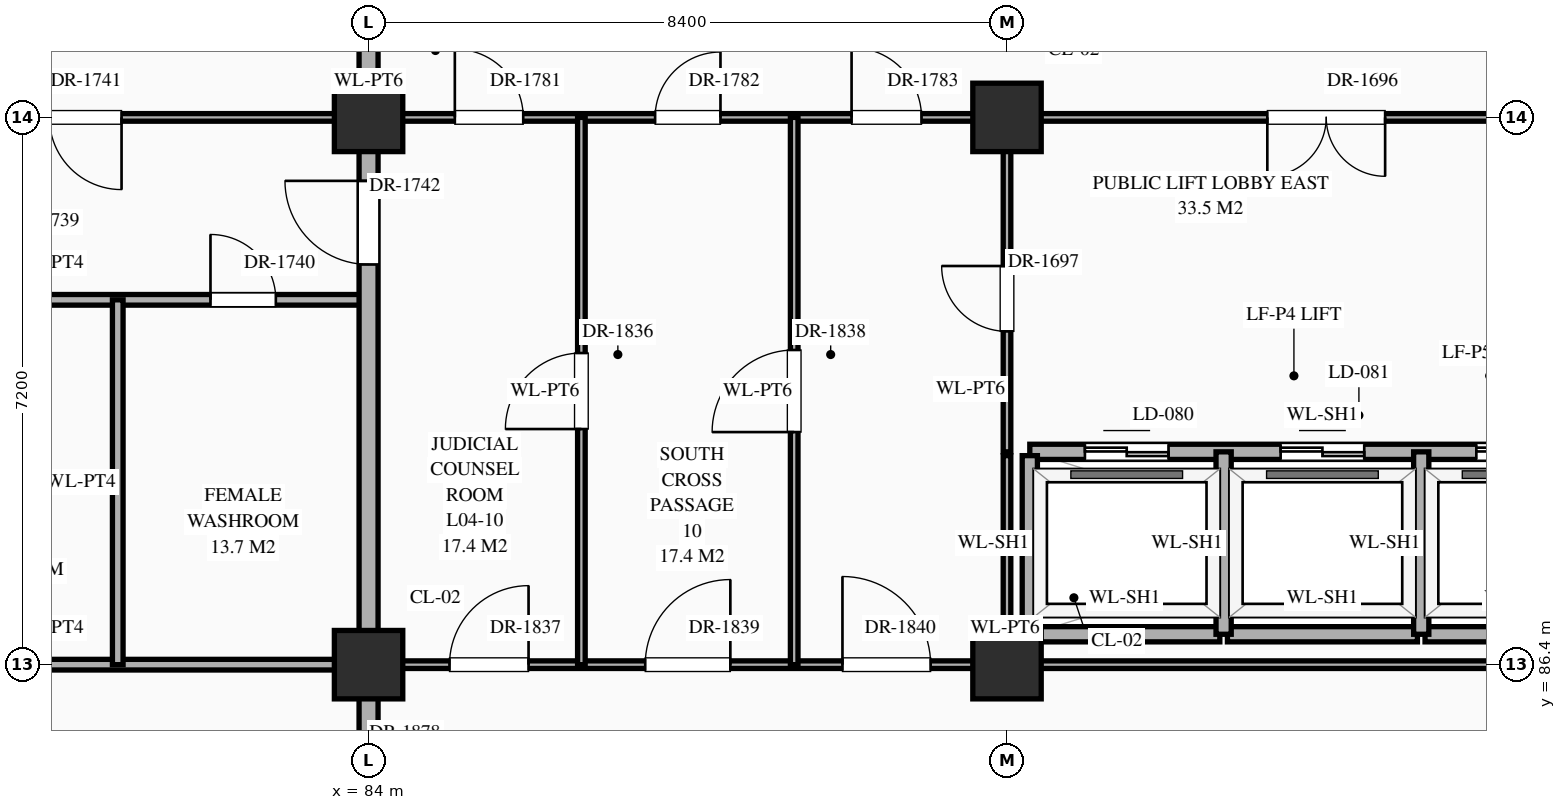
"""IFC4 building model, lengths in metres.
Left out: names, types, materials, properties, quantities, classifications, styles, units other than length and angle.
Written with IfcOpenShell. Run it as: python <this file> out.ifc"""

import sys

from ifc_helpers import new_model, si_unit, direction, frame, frame_2d, origin, origin_2d, place, context, subcontext, project, spatial, rectangle, extrude, element, fill, save


model = new_model("IFC4")
c1 = context("Model", 3, precision=1e-05, world=origin(), true_north=direction((0.0, 1.0)))
c2 = subcontext(c1, "Body", "Model", "MODEL_VIEW")
j1 = project(units=[si_unit("LENGTHUNIT", "METRE"), si_unit("PLANEANGLEUNIT", "RADIAN")], contexts=[c1])
p1 = place(None, origin())
s1 = spatial("IfcSite", under=j1, at=p1, CompositionType="ELEMENT")
p2 = place(p1, origin())
s2 = spatial("IfcBuilding", under=s1, at=p2, CompositionType="ELEMENT")
p3 = place(p2, frame((0.0, 0.0, 16.2)))
s3 = spatial("IfcBuildingStorey", under=s2, at=p3, CompositionType="ELEMENT", Elevation=16.2)
for number, where, z_axis, x_axis in (
    (1, (84.0, 86.4, 0.0), (0.0, 0.0, 1.0), (1.0, 0.0, 0.0)),
    (2, (84.0, 93.6, 0.0), (0.0, 0.0, 1.0), (1.0, 0.0, 0.0)),
    (3, (92.4, 86.4, 0.0), (0.0, 0.0, 1.0), (1.0, 0.0, 0.0)),
    (4, (92.4, 93.6, 0.0), (0.0, 0.0, 1.0), (1.0, 0.0, 0.0)),
):
    element("IfcColumn", number, at=place(p3, frame(where, z_axis=z_axis, x_axis=x_axis)), inside=s3, PredefinedType="COLUMN", context=c2, shape_type="SweptSolid", body=[
        extrude(rectangle(XDim=0.9, YDim=0.9, at=origin_2d()), origin(), (0.0, 0.0, 1.0), 5.4),
    ])
p4 = place(p3, frame((75.6, 86.4, 0.0), z_axis=(0.0, 0.0, 1.0), x_axis=(1.0, 0.0, 0.0)))
e5 = element("IfcWall", 5, at=p4, inside=s3, PredefinedType="STANDARD", context=c2, shape_type="SweptSolid", body=[
    extrude(rectangle(XDim=8.4, YDim=0.14, at=frame_2d((4.2, 0.0))), origin(), (0.0, 0.0, 1.0), 4.27),
])
p5 = place(p3, frame((84.0, 86.4, 0.0), z_axis=(0.0, 0.0, 1.0), x_axis=(1.0, 0.0, 0.0)))
e6 = element("IfcWall", 6, at=p5, inside=s3, PredefinedType="STANDARD", context=c2, shape_type="SweptSolid", body=[
    extrude(rectangle(XDim=8.4, YDim=0.1, at=frame_2d((4.2, 0.0))), origin(), (0.0, 0.0, 1.0), 4.27),
])
p6 = place(p5, frame((1.065, 0.0, 0.0)))
e7 = element("IfcOpeningElement", 7, at=p6, cuts=e6, PredefinedType="OPENING", context=c2, shape_type="SweptSolid", body=[
    extrude(rectangle(XDim=1.04, YDim=2.2, at=frame_2d((0.52, 1.1))), frame((0.0, 0.062, 0.0), z_axis=(0.0, -1.0, 0.0), x_axis=(1.0, 0.0, 0.0)), (0.0, 0.0, 1.0), 0.124),
])
p7 = place(p5, frame((3.64, 0.0, 0.0)))
e8 = element("IfcOpeningElement", 8, at=p7, cuts=e6, PredefinedType="OPENING", context=c2, shape_type="SweptSolid", body=[
    extrude(rectangle(XDim=1.12, YDim=2.25, at=frame_2d((0.56, 1.125))), frame((0.0, 0.062, 0.0), z_axis=(0.0, -1.0, 0.0), x_axis=(1.0, 0.0, 0.0)), (0.0, 0.0, 1.0), 0.124),
])
p8 = place(p5, frame((6.235, 0.0, 0.0)))
e9 = element("IfcOpeningElement", 9, at=p8, cuts=e6, PredefinedType="OPENING", context=c2, shape_type="SweptSolid", body=[
    extrude(rectangle(XDim=1.16, YDim=2.3, at=frame_2d((0.58, 1.15))), frame((0.0, 0.062, 0.0), z_axis=(0.0, -1.0, 0.0), x_axis=(1.0, 0.0, 0.0)), (0.0, 0.0, 1.0), 0.124),
])
p9 = place(p3, frame((92.45, 86.4, 0.0), z_axis=(0.0, 0.0, 1.0), x_axis=(1.0, 0.0, 0.0)))
e10 = element("IfcWall", 10, at=p9, inside=s3, PredefinedType="STANDARD", context=c2, shape_type="SweptSolid", body=[
    extrude(rectangle(XDim=8.3, YDim=0.1, at=frame_2d((4.15, 0.0))), origin(), (0.0, 0.0, 1.0), 4.27),
])
for number, where, z_axis, x_axis in (
    (11, (92.7, 86.8, 0.0), (0.0, 0.0, 1.0), (1.0, 0.0, 0.0)),
    (12, (95.3, 86.8, 0.0), (0.0, 0.0, 1.0), (1.0, 0.0, 0.0)),
    (13, (97.9, 86.8, 0.0), (0.0, 0.0, 1.0), (1.0, 0.0, 0.0)),
):
    element("IfcWall", number, at=place(p3, frame(where, z_axis=z_axis, x_axis=x_axis)), inside=s3, PredefinedType="STANDARD", context=c2, shape_type="SweptSolid", body=[
        extrude(rectangle(XDim=2.5, YDim=0.2, at=frame_2d((1.25, 0.0))), origin(), (0.0, 0.0, 1.0), 5.12),
    ])
p10 = place(p3, frame((92.7, 89.2, 0.0), z_axis=(0.0, 0.0, 1.0), x_axis=(1.0, 0.0, 0.0)))
e14 = element("IfcWall", 14, at=p10, inside=s3, PredefinedType="STANDARD", context=c2, shape_type="SweptSolid", body=[
    extrude(rectangle(XDim=7.7, YDim=0.2, at=frame_2d((3.85, 0.0))), origin(), (0.0, 0.0, 1.0), 5.12),
])
p11 = place(p10, frame((0.725, 0.0, 0.0)))
e15 = element("IfcOpeningElement", 15, at=p11, cuts=e14, PredefinedType="OPENING", context=c2, shape_type="SweptSolid", body=[
    extrude(rectangle(XDim=1.1, YDim=2.15, at=frame_2d((0.55, 1.075))), frame((0.0, 0.112, 0.0), z_axis=(0.0, -1.0, 0.0), x_axis=(1.0, 0.0, 0.0)), (0.0, 0.0, 1.0), 0.224),
])
p12 = place(p10, frame((3.3, 0.0, 0.0)))
e16 = element("IfcOpeningElement", 16, at=p12, cuts=e14, PredefinedType="OPENING", context=c2, shape_type="SweptSolid", body=[
    extrude(rectangle(XDim=1.1, YDim=2.15, at=frame_2d((0.55, 1.075))), frame((0.0, 0.112, 0.0), z_axis=(0.0, -1.0, 0.0), x_axis=(1.0, 0.0, 0.0)), (0.0, 0.0, 1.0), 0.224),
])
p13 = place(p10, frame((5.875, 0.0, 0.0)))
e17 = element("IfcOpeningElement", 17, at=p13, cuts=e14, PredefinedType="OPENING", context=c2, shape_type="SweptSolid", body=[
    extrude(rectangle(XDim=1.1, YDim=2.15, at=frame_2d((0.55, 1.075))), frame((0.0, 0.112, 0.0), z_axis=(0.0, -1.0, 0.0), x_axis=(1.0, 0.0, 0.0)), (0.0, 0.0, 1.0), 0.224),
])
p14 = place(p3, frame((75.6, 91.2, 0.0), z_axis=(0.0, 0.0, 1.0), x_axis=(1.0, 0.0, 0.0)))
e18 = element("IfcWall", 18, at=p14, inside=s3, PredefinedType="STANDARD", context=c2, shape_type="SweptSolid", body=[
    extrude(rectangle(XDim=8.4, YDim=0.14, at=frame_2d((4.2, 0.0))), origin(), (0.0, 0.0, 1.0), 5.12),
])
p15 = place(p14, frame((0.65, 0.0, 0.0)))
e19 = element("IfcOpeningElement", 19, at=p15, cuts=e18, PredefinedType="OPENING", context=c2, shape_type="SweptSolid", body=[
    extrude(rectangle(XDim=0.9, YDim=2.15, at=frame_2d((0.45, 1.075))), frame((0.0, 0.082, 0.0), z_axis=(0.0, -1.0, 0.0), x_axis=(1.0, 0.0, 0.0)), (0.0, 0.0, 1.0), 0.164),
])
p16 = place(p14, frame((3.22, 0.0, 0.0)))
e20 = element("IfcOpeningElement", 20, at=p16, cuts=e18, PredefinedType="OPENING", context=c2, shape_type="SweptSolid", body=[
    extrude(rectangle(XDim=0.86, YDim=2.1, at=frame_2d((0.43, 1.05))), frame((0.0, 0.082, 0.0), z_axis=(0.0, -1.0, 0.0), x_axis=(1.0, 0.0, 0.0)), (0.0, 0.0, 1.0), 0.164),
])
p17 = place(p14, frame((6.32, 0.0, 0.0)))
e21 = element("IfcOpeningElement", 21, at=p17, cuts=e18, PredefinedType="OPENING", context=c2, shape_type="SweptSolid", body=[
    extrude(rectangle(XDim=0.86, YDim=2.1, at=frame_2d((0.43, 1.05))), frame((0.0, 0.082, 0.0), z_axis=(0.0, -1.0, 0.0), x_axis=(1.0, 0.0, 0.0)), (0.0, 0.0, 1.0), 0.164),
])
p18 = place(p3, frame((67.2, 93.6, 0.0), z_axis=(0.0, 0.0, 1.0), x_axis=(1.0, 0.0, 0.0)))
e22 = element("IfcWall", 22, at=p18, inside=s3, PredefinedType="STANDARD", context=c2, shape_type="SweptSolid", body=[
    extrude(rectangle(XDim=33.6, YDim=0.1, at=frame_2d((16.8, 0.0))), origin(), (0.0, 0.0, 1.0), 4.27),
])
p19 = place(p18, frame((3.375, 0.0, 0.0)))
e23 = element("IfcOpeningElement", 23, at=p19, cuts=e22, PredefinedType="OPENING", context=c2, shape_type="SweptSolid", body=[
    extrude(rectangle(XDim=1.65, YDim=2.4, at=frame_2d((0.825, 1.2))), frame((0.0, 0.062, 0.0), z_axis=(0.0, -1.0, 0.0), x_axis=(1.0, 0.0, 0.0)), (0.0, 0.0, 1.0), 0.124),
])
p20 = place(p18, frame((28.625, 0.0, 0.0)))
e24 = element("IfcOpeningElement", 24, at=p20, cuts=e22, PredefinedType="OPENING", context=c2, shape_type="SweptSolid", body=[
    extrude(rectangle(XDim=1.55, YDim=2.35, at=frame_2d((0.775, 1.175))), frame((0.0, 0.062, 0.0), z_axis=(0.0, -1.0, 0.0), x_axis=(1.0, 0.0, 0.0)), (0.0, 0.0, 1.0), 0.124),
])
p21 = place(p18, frame((11.65, 0.0, 0.0)))
e25 = element("IfcOpeningElement", 25, at=p21, cuts=e22, PredefinedType="OPENING", context=c2, shape_type="SweptSolid", body=[
    extrude(rectangle(XDim=1.9, YDim=2.5, at=frame_2d((0.95, 1.25))), frame((0.0, 0.062, 0.0), z_axis=(0.0, -1.0, 0.0), x_axis=(1.0, 0.0, 0.0)), (0.0, 0.0, 1.0), 0.124),
])
p22 = place(p18, frame((17.935, 0.0, 0.0)))
e26 = element("IfcOpeningElement", 26, at=p22, cuts=e22, PredefinedType="OPENING", context=c2, shape_type="SweptSolid", body=[
    extrude(rectangle(XDim=0.9, YDim=2.15, at=frame_2d((0.45, 1.075))), frame((0.0, 0.062, 0.0), z_axis=(0.0, -1.0, 0.0), x_axis=(1.0, 0.0, 0.0)), (0.0, 0.0, 1.0), 0.124),
])
p23 = place(p18, frame((20.57, 0.0, 0.0)))
e27 = element("IfcOpeningElement", 27, at=p23, cuts=e22, PredefinedType="OPENING", context=c2, shape_type="SweptSolid", body=[
    extrude(rectangle(XDim=0.86, YDim=2.1, at=frame_2d((0.43, 1.05))), frame((0.0, 0.062, 0.0), z_axis=(0.0, -1.0, 0.0), x_axis=(1.0, 0.0, 0.0)), (0.0, 0.0, 1.0), 0.124),
])
p24 = place(p18, frame((23.155, 0.0, 0.0)))
e28 = element("IfcOpeningElement", 28, at=p24, cuts=e22, PredefinedType="OPENING", context=c2, shape_type="SweptSolid", body=[
    extrude(rectangle(XDim=0.92, YDim=2.15, at=frame_2d((0.46, 1.075))), frame((0.0, 0.062, 0.0), z_axis=(0.0, -1.0, 0.0), x_axis=(1.0, 0.0, 0.0)), (0.0, 0.0, 1.0), 0.124),
])
p25 = place(p3, frame((80.7, 86.4, 0.0), z_axis=(0.0, 0.0, 1.0), x_axis=(0.0, 1.0, 0.0)))
e29 = element("IfcWall", 29, at=p25, inside=s3, PredefinedType="STANDARD", context=c2, shape_type="SweptSolid", body=[
    extrude(rectangle(XDim=4.8, YDim=0.14, at=frame_2d((2.4, 0.0))), origin(), (0.0, 0.0, 1.0), 5.12),
])
p26 = place(p3, frame((84.0, 79.2, 0.0), z_axis=(0.0, 0.0, 1.0), x_axis=(0.0, 1.0, 0.0)))
e30 = element("IfcWall", 30, at=p26, inside=s3, PredefinedType="STANDARD", context=c2, shape_type="SweptSolid", body=[
    extrude(rectangle(XDim=35.96, YDim=0.25, at=frame_2d((17.98, 0.0))), origin(), (0.0, 0.0, 1.0), 4.37),
])
p27 = place(p26, frame((22.585, 0.0, 0.0)))
e31 = element("IfcOpeningElement", 31, at=p27, cuts=e30, PredefinedType="OPENING", context=c2, shape_type="SweptSolid", body=[
    extrude(rectangle(XDim=2.0, YDim=2.4, at=frame_2d((1.0, 1.2))), frame((0.0, 0.137, 0.0), z_axis=(0.0, -1.0, 0.0), x_axis=(1.0, 0.0, 0.0)), (0.0, 0.0, 1.0), 0.274),
])
p28 = place(p26, frame((12.465, 0.0, 0.0)))
e32 = element("IfcOpeningElement", 32, at=p28, cuts=e30, PredefinedType="OPENING", context=c2, shape_type="SweptSolid", body=[
    extrude(rectangle(XDim=1.1, YDim=2.2, at=frame_2d((0.55, 1.1))), frame((0.0, 0.137, 0.0), z_axis=(0.0, -1.0, 0.0), x_axis=(1.0, 0.0, 0.0)), (0.0, 0.0, 1.0), 0.274),
])
p29 = place(p26, frame((15.31, 0.0, 0.0)))
e33 = element("IfcOpeningElement", 33, at=p29, cuts=e30, PredefinedType="OPENING", context=c2, shape_type="SweptSolid", body=[
    extrude(rectangle(XDim=0.95, YDim=2.15, at=frame_2d((0.475, 1.075))), frame((0.0, 0.137, 0.0), z_axis=(0.0, -1.0, 0.0), x_axis=(1.0, 0.0, 0.0)), (0.0, 0.0, 1.0), 0.274),
])
p30 = place(p26, frame((26.065, 0.0, 0.0)))
e34 = element("IfcOpeningElement", 34, at=p30, cuts=e30, PredefinedType="OPENING", context=c2, shape_type="SweptSolid", body=[
    extrude(rectangle(XDim=1.5, YDim=2.25, at=frame_2d((0.75, 1.125))), frame((0.0, 0.137, 0.0), z_axis=(0.0, -1.0, 0.0), x_axis=(1.0, 0.0, 0.0)), (0.0, 0.0, 1.0), 0.274),
])
p31 = place(p26, frame((29.71, 0.0, 0.0)))
e35 = element("IfcOpeningElement", 35, at=p31, cuts=e30, PredefinedType="OPENING", context=c2, shape_type="SweptSolid", body=[
    extrude(rectangle(XDim=0.95, YDim=2.15, at=frame_2d((0.475, 1.075))), frame((0.0, 0.137, 0.0), z_axis=(0.0, -1.0, 0.0), x_axis=(1.0, 0.0, 0.0)), (0.0, 0.0, 1.0), 0.274),
])
p32 = place(p26, frame((5.315, 0.0, 0.0)))
e36 = element("IfcOpeningElement", 36, at=p32, cuts=e30, PredefinedType="OPENING", context=c2, shape_type="SweptSolid", body=[
    extrude(rectangle(XDim=1.0, YDim=2.2, at=frame_2d((0.5, 1.1))), frame((0.0, 0.137, 0.0), z_axis=(0.0, -1.0, 0.0), x_axis=(1.0, 0.0, 0.0)), (0.0, 0.0, 1.0), 0.274),
])
p33 = place(p3, frame((86.8, 86.4, 0.0), z_axis=(0.0, 0.0, 1.0), x_axis=(0.0, 1.0, 0.0)))
e37 = element("IfcWall", 37, at=p33, inside=s3, PredefinedType="STANDARD", context=c2, shape_type="SweptSolid", body=[
    extrude(rectangle(XDim=7.2, YDim=0.1, at=frame_2d((3.6, 0.0))), origin(), (0.0, 0.0, 1.0), 5.12),
])
p34 = place(p33, frame((3.1, 0.0, 0.0)))
e38 = element("IfcOpeningElement", 38, at=p34, cuts=e37, PredefinedType="OPENING", context=c2, shape_type="SweptSolid", body=[
    extrude(rectangle(XDim=1.0, YDim=2.25, at=frame_2d((0.5, 1.125))), frame((0.0, 0.062, 0.0), z_axis=(0.0, -1.0, 0.0), x_axis=(1.0, 0.0, 0.0)), (0.0, 0.0, 1.0), 0.124),
])
p35 = place(p3, frame((89.6, 86.4, 0.0), z_axis=(0.0, 0.0, 1.0), x_axis=(0.0, 1.0, 0.0)))
e39 = element("IfcWall", 39, at=p35, inside=s3, PredefinedType="STANDARD", context=c2, shape_type="SweptSolid", body=[
    extrude(rectangle(XDim=7.2, YDim=0.1, at=frame_2d((3.6, 0.0))), origin(), (0.0, 0.0, 1.0), 5.12),
])
p36 = place(p35, frame((3.06, 0.0, 0.0)))
e40 = element("IfcOpeningElement", 40, at=p36, cuts=e39, PredefinedType="OPENING", context=c2, shape_type="SweptSolid", body=[
    extrude(rectangle(XDim=1.08, YDim=2.25, at=frame_2d((0.54, 1.125))), frame((0.0, 0.062, 0.0), z_axis=(0.0, -1.0, 0.0), x_axis=(1.0, 0.0, 0.0)), (0.0, 0.0, 1.0), 0.124),
])
p37 = place(p3, frame((92.4, 86.45, 0.0), z_axis=(0.0, 0.0, 1.0), x_axis=(0.0, 1.0, 0.0)))
e41 = element("IfcWall", 41, at=p37, inside=s3, PredefinedType="STANDARD", context=c2, shape_type="SweptSolid", body=[
    extrude(rectangle(XDim=2.7, YDim=0.1, at=frame_2d((1.35, 0.0))), origin(), (0.0, 0.0, 1.0), 4.37),
])
p38 = place(p3, frame((92.4, 89.2, 0.0), z_axis=(0.0, 0.0, 1.0), x_axis=(0.0, 1.0, 0.0)))
e42 = element("IfcWall", 42, at=p38, inside=s3, PredefinedType="STANDARD", context=c2, shape_type="SweptSolid", body=[
    extrude(rectangle(XDim=4.4, YDim=0.1, at=frame_2d((2.2, 0.0))), origin(), (0.0, 0.0, 1.0), 4.37),
])
p39 = place(p38, frame((1.585, 0.0, 0.0)))
e43 = element("IfcOpeningElement", 43, at=p39, cuts=e42, PredefinedType="OPENING", context=c2, shape_type="SweptSolid", body=[
    extrude(rectangle(XDim=0.86, YDim=2.1, at=frame_2d((0.43, 1.05))), frame((0.0, 0.062, 0.0), z_axis=(0.0, -1.0, 0.0), x_axis=(1.0, 0.0, 0.0)), (0.0, 0.0, 1.0), 0.124),
])
p40 = place(p3, frame((92.7, 86.85, 0.0), z_axis=(0.0, 0.0, 1.0), x_axis=(0.0, 1.0, 0.0)))
e44 = element("IfcWall", 44, at=p40, inside=s3, PredefinedType="STANDARD", context=c2, shape_type="SweptSolid", body=[
    extrude(rectangle(XDim=2.3, YDim=0.2, at=frame_2d((1.15, 0.0))), origin(), (0.0, 0.0, 1.0), 5.12),
])
for number, where, z_axis, x_axis in (
    (45, (95.25, 86.8, 0.0), (0.0, 0.0, 1.0), (0.0, 1.0, 0.0)),
    (46, (97.85, 86.8, 0.0), (0.0, 0.0, 1.0), (0.0, 1.0, 0.0)),
):
    element("IfcWall", number, at=place(p3, frame(where, z_axis=z_axis, x_axis=x_axis)), inside=s3, PredefinedType="STANDARD", context=c2, shape_type="SweptSolid", body=[
        extrude(rectangle(XDim=2.4, YDim=0.2, at=frame_2d((1.2, 0.0))), origin(), (0.0, 0.0, 1.0), 5.12),
    ])
p41 = place(p11, origin())
e47 = element("IfcDoor", 47, at=p41, inside=s3, OperationType="DOUBLE_DOOR_SLIDING", PredefinedType="DOOR", context=c2, shape_type="SweptSolid", body=[
    extrude(rectangle(XDim=1.1, YDim=2.15, at=frame_2d((0.55, 1.075))), frame((0.0, 0.025, 0.0), z_axis=(0.0, -1.0, 0.0), x_axis=(1.0, 0.0, 0.0)), (0.0, 0.0, 1.0), 0.05),
])
fill(e15, e47)
p42 = place(p12, origin())
e48 = element("IfcDoor", 48, at=p42, inside=s3, OperationType="DOUBLE_DOOR_SLIDING", PredefinedType="DOOR", context=c2, shape_type="SweptSolid", body=[
    extrude(rectangle(XDim=1.1, YDim=2.15, at=frame_2d((0.55, 1.075))), frame((0.0, 0.025, 0.0), z_axis=(0.0, -1.0, 0.0), x_axis=(1.0, 0.0, 0.0)), (0.0, 0.0, 1.0), 0.05),
])
fill(e16, e48)
p43 = place(p13, origin())
e49 = element("IfcDoor", 49, at=p43, inside=s3, OperationType="DOUBLE_DOOR_SLIDING", PredefinedType="DOOR", context=c2, shape_type="SweptSolid", body=[
    extrude(rectangle(XDim=1.1, YDim=2.15, at=frame_2d((0.55, 1.075))), frame((0.0, 0.025, 0.0), z_axis=(0.0, -1.0, 0.0), x_axis=(1.0, 0.0, 0.0)), (0.0, 0.0, 1.0), 0.05),
])
fill(e17, e49)
p44 = place(p20, frame((1.55, 0.0, 0.0), z_axis=(0.0, 0.0, 1.0), x_axis=(-1.0, 0.0, 0.0)))
e50 = element("IfcDoor", 50, at=p44, inside=s3, OperationType="DOUBLE_DOOR_SINGLE_SWING", PredefinedType="DOOR", context=c2, shape_type="SweptSolid", body=[
    extrude(rectangle(XDim=1.55, YDim=2.35, at=frame_2d((0.775, 1.175))), frame((0.0, 0.025, 0.0), z_axis=(0.0, -1.0, 0.0), x_axis=(1.0, 0.0, 0.0)), (0.0, 0.0, 1.0), 0.05),
])
fill(e24, e50)
p45 = place(p39, origin())
e51 = element("IfcDoor", 51, at=p45, inside=s3, OperationType="SINGLE_SWING_RIGHT", PredefinedType="DOOR", context=c2, shape_type="SweptSolid", body=[
    extrude(rectangle(XDim=0.86, YDim=2.1, at=frame_2d((0.43, 1.05))), frame((0.0, 0.025, 0.0), z_axis=(0.0, -1.0, 0.0), x_axis=(1.0, 0.0, 0.0)), (0.0, 0.0, 1.0), 0.05),
])
fill(e43, e51)
p46 = place(p17, origin())
e52 = element("IfcDoor", 52, at=p46, inside=s3, OperationType="SINGLE_SWING_LEFT", PredefinedType="DOOR", context=c2, shape_type="SweptSolid", body=[
    extrude(rectangle(XDim=0.86, YDim=2.1, at=frame_2d((0.43, 1.05))), frame((0.0, 0.025, 0.0), z_axis=(0.0, -1.0, 0.0), x_axis=(1.0, 0.0, 0.0)), (0.0, 0.0, 1.0), 0.05),
])
fill(e21, e52)
p47 = place(p21, frame((1.9, 0.0, 0.0), z_axis=(0.0, 0.0, 1.0), x_axis=(-1.0, 0.0, 0.0)))
e53 = element("IfcDoor", 53, at=p47, inside=s3, OperationType="DOUBLE_DOOR_SINGLE_SWING", PredefinedType="DOOR", context=c2, shape_type="SweptSolid", body=[
    extrude(rectangle(XDim=1.9, YDim=2.5, at=frame_2d((0.95, 1.25))), frame((0.0, 0.025, 0.0), z_axis=(0.0, -1.0, 0.0), x_axis=(1.0, 0.0, 0.0)), (0.0, 0.0, 1.0), 0.05),
])
fill(e25, e53)
p48 = place(p28, origin())
e54 = element("IfcDoor", 54, at=p48, inside=s3, OperationType="SINGLE_SWING_RIGHT", PredefinedType="DOOR", context=c2, shape_type="SweptSolid", body=[
    extrude(rectangle(XDim=1.1, YDim=2.2, at=frame_2d((0.55, 1.1))), frame((0.0, 0.025, 0.0), z_axis=(0.0, -1.0, 0.0), x_axis=(1.0, 0.0, 0.0)), (0.0, 0.0, 1.0), 0.05),
])
fill(e32, e54)
p49 = place(p22, origin())
e55 = element("IfcDoor", 55, at=p49, inside=s3, OperationType="SINGLE_SWING_LEFT", PredefinedType="DOOR", context=c2, shape_type="SweptSolid", body=[
    extrude(rectangle(XDim=0.9, YDim=2.15, at=frame_2d((0.45, 1.075))), frame((0.0, 0.025, 0.0), z_axis=(0.0, -1.0, 0.0), x_axis=(1.0, 0.0, 0.0)), (0.0, 0.0, 1.0), 0.05),
])
fill(e26, e55)
p50 = place(p23, origin())
e56 = element("IfcDoor", 56, at=p50, inside=s3, OperationType="SINGLE_SWING_RIGHT", PredefinedType="DOOR", context=c2, shape_type="SweptSolid", body=[
    extrude(rectangle(XDim=0.86, YDim=2.1, at=frame_2d((0.43, 1.05))), frame((0.0, 0.025, 0.0), z_axis=(0.0, -1.0, 0.0), x_axis=(1.0, 0.0, 0.0)), (0.0, 0.0, 1.0), 0.05),
])
fill(e27, e56)
p51 = place(p24, origin())
e57 = element("IfcDoor", 57, at=p51, inside=s3, OperationType="SINGLE_SWING_LEFT", PredefinedType="DOOR", context=c2, shape_type="SweptSolid", body=[
    extrude(rectangle(XDim=0.92, YDim=2.15, at=frame_2d((0.46, 1.075))), frame((0.0, 0.025, 0.0), z_axis=(0.0, -1.0, 0.0), x_axis=(1.0, 0.0, 0.0)), (0.0, 0.0, 1.0), 0.05),
])
fill(e28, e57)
p52 = place(p34, origin())
e58 = element("IfcDoor", 58, at=p52, inside=s3, OperationType="SINGLE_SWING_LEFT", PredefinedType="DOOR", context=c2, shape_type="SweptSolid", body=[
    extrude(rectangle(XDim=1.0, YDim=2.25, at=frame_2d((0.5, 1.125))), frame((0.0, 0.025, 0.0), z_axis=(0.0, -1.0, 0.0), x_axis=(1.0, 0.0, 0.0)), (0.0, 0.0, 1.0), 0.05),
])
fill(e38, e58)
p53 = place(p6, origin())
e59 = element("IfcDoor", 59, at=p53, inside=s3, OperationType="SINGLE_SWING_RIGHT", PredefinedType="DOOR", context=c2, shape_type="SweptSolid", body=[
    extrude(rectangle(XDim=1.04, YDim=2.2, at=frame_2d((0.52, 1.1))), frame((0.0, 0.025, 0.0), z_axis=(0.0, -1.0, 0.0), x_axis=(1.0, 0.0, 0.0)), (0.0, 0.0, 1.0), 0.05),
])
fill(e7, e59)
p54 = place(p36, origin())
e60 = element("IfcDoor", 60, at=p54, inside=s3, OperationType="SINGLE_SWING_LEFT", PredefinedType="DOOR", context=c2, shape_type="SweptSolid", body=[
    extrude(rectangle(XDim=1.08, YDim=2.25, at=frame_2d((0.54, 1.125))), frame((0.0, 0.025, 0.0), z_axis=(0.0, -1.0, 0.0), x_axis=(1.0, 0.0, 0.0)), (0.0, 0.0, 1.0), 0.05),
])
fill(e40, e60)
p55 = place(p7, origin())
e61 = element("IfcDoor", 61, at=p55, inside=s3, OperationType="SINGLE_SWING_RIGHT", PredefinedType="DOOR", context=c2, shape_type="SweptSolid", body=[
    extrude(rectangle(XDim=1.12, YDim=2.25, at=frame_2d((0.56, 1.125))), frame((0.0, 0.025, 0.0), z_axis=(0.0, -1.0, 0.0), x_axis=(1.0, 0.0, 0.0)), (0.0, 0.0, 1.0), 0.05),
])
fill(e8, e61)
p56 = place(p8, origin())
e62 = element("IfcDoor", 62, at=p56, inside=s3, OperationType="SINGLE_SWING_LEFT", PredefinedType="DOOR", context=c2, shape_type="SweptSolid", body=[
    extrude(rectangle(XDim=1.16, YDim=2.3, at=frame_2d((0.58, 1.15))), frame((0.0, 0.025, 0.0), z_axis=(0.0, -1.0, 0.0), x_axis=(1.0, 0.0, 0.0)), (0.0, 0.0, 1.0), 0.05),
])
fill(e9, e62)
save(model, sys.argv[1])
